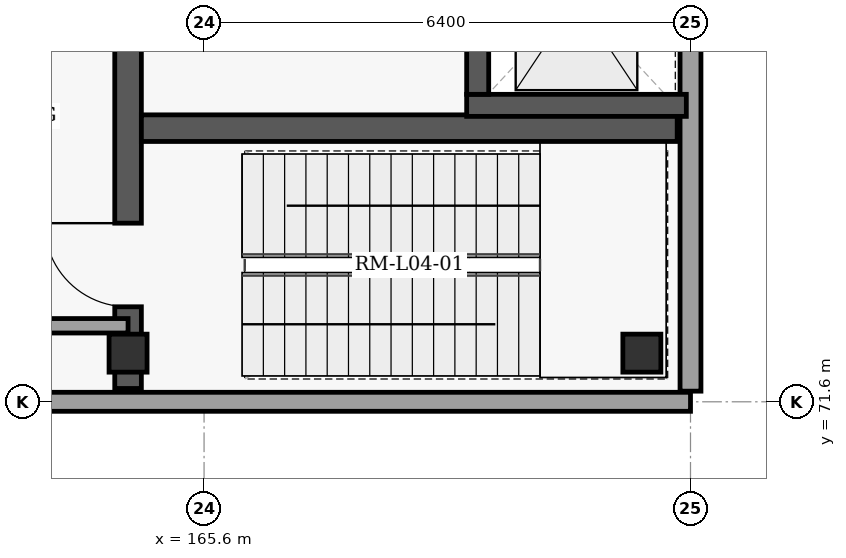
"""IFC4 building model, lengths in metres.
Left out: names, types, materials, properties, quantities, classifications, styles, units other than length and angle.
Written with IfcOpenShell. Run it as: python <this file> out.ifc"""

import sys

from ifc_helpers import new_model, si_unit, direction, frame, frame_2d, origin, origin_2d, place, context, subcontext, project, spatial, rectangle, extrude, element, fill, save


model = new_model("IFC4")
c1 = context("Model", 3, precision=1e-05, world=origin(), true_north=direction((0.0, 1.0)))
c2 = subcontext(c1, "Body", "Model", "MODEL_VIEW")
j1 = project(units=[si_unit("LENGTHUNIT", "METRE"), si_unit("PLANEANGLEUNIT", "RADIAN")], contexts=[c1])
p1 = place(None, origin())
s1 = spatial("IfcSite", under=j1, at=p1, CompositionType="ELEMENT")
p2 = place(p1, origin())
s2 = spatial("IfcBuilding", under=s1, at=p2, CompositionType="ELEMENT")
p3 = place(p2, frame((0.0, 0.0, 20.4)))
s3 = spatial("IfcBuildingStorey", under=s2, at=p3, CompositionType="ELEMENT", Elevation=20.4)
for number, where, z_axis, x_axis in (
    (1, (164.6, 72.24, 0.0), (0.0, 0.0, 1.0), (1.0, 0.0, 0.0)),
    (2, (171.36, 72.24, 0.0), (0.0, 0.0, 1.0), (1.0, 0.0, 0.0)),
):
    element("IfcColumn", number, at=place(p3, frame(where, z_axis=z_axis, x_axis=x_axis)), inside=s3, PredefinedType="COLUMN", context=c2, shape_type="SweptSolid", body=[
        extrude(rectangle(XDim=0.5, YDim=0.5, at=origin_2d()), origin(), (0.0, 0.0, 1.0), 4.5),
    ])
p4 = place(p3, frame((172.0, 117.86, 0.0), z_axis=(0.0, 0.0, 1.0), x_axis=(0.0, -1.0, 0.0)))
e3 = element("IfcWall", 3, at=p4, inside=s3, PredefinedType="SOLIDWALL", context=c2, shape_type="SweptSolid", body=[
    extrude(rectangle(XDim=46.12, YDim=0.275, at=frame_2d((23.06, 0.0))), origin(), (0.0, 0.0, 1.0), 4.3),
])
p5 = place(p3, frame((172.0, 71.6, 0.0), z_axis=(0.0, 0.0, 1.0), x_axis=(-1.0, 0.0, 0.0)))
e4 = element("IfcWall", 4, at=p5, inside=s3, PredefinedType="SOLIDWALL", context=c2, shape_type="SweptSolid", body=[
    extrude(rectangle(XDim=19.2, YDim=0.25, at=frame_2d((9.6, 0.0))), origin(), (0.0, 0.0, 1.0), 4.3),
])
p6 = place(p5, frame((10.0, 0.0, 0.8)))
e5 = element("IfcOpeningElement", 5, at=p6, cuts=e4, PredefinedType="OPENING", context=c2, shape_type="SweptSolid", body=[
    extrude(rectangle(XDim=1.6, YDim=2.75, at=frame_2d((0.8, 1.375))), frame((0.0, 0.135, 0.0), z_axis=(0.0, -1.0, 0.0), x_axis=(1.0, 0.0, 0.0)), (0.0, 0.0, 1.0), 0.27),
])
p7 = place(p3, frame((164.6, 71.775, 0.0), z_axis=(0.0, 0.0, 1.0), x_axis=(0.0, 1.0, 0.0)))
e6 = element("IfcWall", 6, at=p7, inside=s3, PredefinedType="SHEAR", context=c2, shape_type="SweptSolid", body=[
    extrude(rectangle(XDim=7.573, YDim=0.35, at=frame_2d((3.787, 0.0))), origin(), (0.0, 0.0, 1.0), 4.3),
])
p8 = place(p7, frame((1.075, 0.0, 0.0)))
e7 = element("IfcOpeningElement", 7, at=p8, cuts=e6, PredefinedType="OPENING", context=c2, shape_type="SweptSolid", body=[
    extrude(rectangle(XDim=1.1, YDim=2.15, at=frame_2d((0.55, 1.075))), frame((0.0, 0.185, 0.0), z_axis=(0.0, -1.0, 0.0), x_axis=(1.0, 0.0, 0.0)), (0.0, 0.0, 1.0), 0.37),
])
p9 = place(p7, frame((5.05, 0.0, 0.0)))
e8 = element("IfcOpeningElement", 8, at=p9, cuts=e6, PredefinedType="OPENING", context=c2, shape_type="SweptSolid", body=[
    extrude(rectangle(XDim=1.15, YDim=2.2, at=frame_2d((0.575, 1.1))), frame((0.0, 0.185, 0.0), z_axis=(0.0, -1.0, 0.0), x_axis=(1.0, 0.0, 0.0)), (0.0, 0.0, 1.0), 0.37),
])
p10 = place(p3, frame((164.775, 75.2, 0.0), z_axis=(0.0, 0.0, 1.0), x_axis=(1.0, 0.0, 0.0)))
e9 = element("IfcWall", 9, at=p10, inside=s3, PredefinedType="SHEAR", context=c2, shape_type="SweptSolid", body=[
    extrude(rectangle(XDim=7.05, YDim=0.35, at=frame_2d((3.525, 0.0))), origin(), (0.0, 0.0, 1.0), 4.3),
])
p11 = place(p3, frame((169.055, 75.5, 0.0), z_axis=(0.0, 0.0, 1.0), x_axis=(1.0, 0.0, 0.0)))
e10 = element("IfcWall", 10, at=p11, inside=s3, PredefinedType="SHEAR", context=c2, shape_type="SweptSolid", body=[
    extrude(rectangle(XDim=2.89, YDim=0.29, at=frame_2d((1.445, 0.0))), origin(), (0.0, 0.0, 1.0), 4.3),
])
p12 = place(p3, frame((169.2, 75.645, 0.0), z_axis=(0.0, 0.0, 1.0), x_axis=(0.0, 1.0, 0.0)))
e11 = element("IfcWall", 11, at=p12, inside=s3, PredefinedType="SHEAR", context=c2, shape_type="SweptSolid", body=[
    extrude(rectangle(XDim=2.51, YDim=0.29, at=frame_2d((1.255, 0.0))), origin(), (0.0, 0.0, 1.0), 4.3),
])
p13 = place(p12, frame((0.705, 0.0, 0.0)))
e12 = element("IfcOpeningElement", 12, at=p13, cuts=e11, PredefinedType="OPENING", context=c2, shape_type="SweptSolid", body=[
    extrude(rectangle(XDim=1.1, YDim=2.15, at=frame_2d((0.55, 1.075))), frame((0.0, 0.155, 0.0), z_axis=(0.0, -1.0, 0.0), x_axis=(1.0, 0.0, 0.0)), (0.0, 0.0, 1.0), 0.31),
])
p14 = place(p3, frame((160.105, 72.6, 0.0), z_axis=(0.0, 0.0, 1.0), x_axis=(1.0, 0.0, 0.0)))
e13 = element("IfcWall", 13, at=p14, inside=s3, PredefinedType="PARTITIONING", context=c2, shape_type="SweptSolid", body=[
    extrude(rectangle(XDim=4.495, YDim=0.19, at=frame_2d((2.248, 0.0))), origin(), (0.0, 0.0, 1.0), 3.65),
])
p15 = place(p8, origin())
e14 = element("IfcDoor", 14, at=p15, inside=s3, OperationType="SINGLE_SWING_RIGHT", PredefinedType="DOOR", context=c2, shape_type="SweptSolid", body=[
    extrude(rectangle(XDim=1.1, YDim=2.15, at=frame_2d((0.55, 1.075))), frame((0.0, 0.025, 0.0), z_axis=(0.0, -1.0, 0.0), x_axis=(1.0, 0.0, 0.0)), (0.0, 0.0, 1.0), 0.05),
])
fill(e7, e14)
save(model, sys.argv[1])
